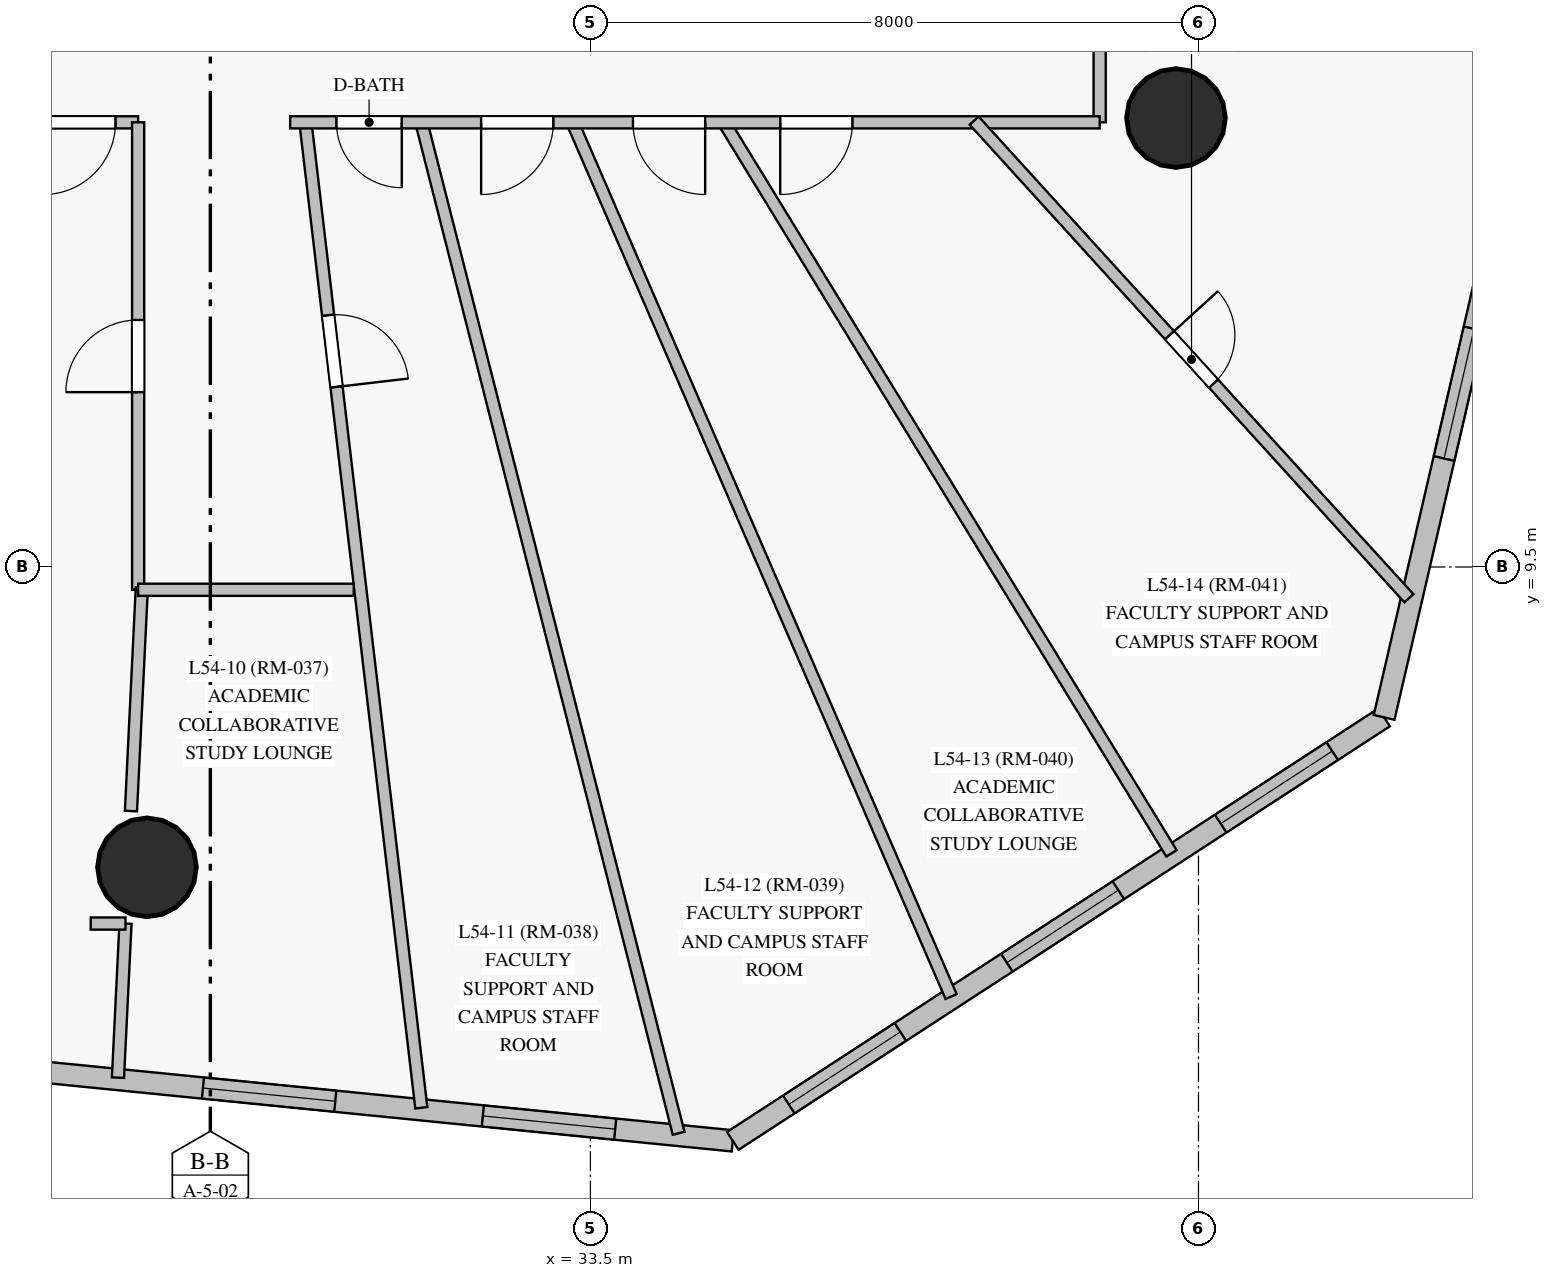
"""IFC4 building model, lengths in metres.
Left out: names, types, materials, properties, quantities, classifications, styles, units other than length and angle.
Written with IfcOpenShell. Run it as: python <this file> out.ifc"""

import sys

from ifc_helpers import new_model, si_unit, direction, frame, frame_2d, origin, origin_with_axes, origin_2d, place, context, subcontext, project, spatial, rectangle, circle, extrude, source, transform, mapped, element, fill, save


model = new_model("IFC4")
c1 = context("Model", 3, precision=1e-05, world=origin(), true_north=direction((0.0, 1.0)))
c2 = subcontext(c1, "Body", "Model", "MODEL_VIEW")
j1 = project(units=[si_unit("LENGTHUNIT", "METRE"), si_unit("PLANEANGLEUNIT", "RADIAN")], contexts=[c1])
p1 = place(None, origin())
s1 = spatial("IfcSite", under=j1, at=p1, CompositionType="ELEMENT")
p2 = place(p1, origin())
s2 = spatial("IfcBuilding", under=s1, at=p2, CompositionType="ELEMENT")
p3 = place(p2, frame((0.0, 0.0, 187.05)))
s3 = spatial("IfcBuildingStorey", under=s2, at=p3, CompositionType="ELEMENT", Elevation=187.05)
m1 = source(origin_with_axes(), c2, "Body", "SweptSolid", [
    extrude(circle(Radius=0.65, at=origin_2d()), origin(), (0.0, 0.0, 1.0), 3.05),
])
for number, where, z_axis, x_axis in (
    (1, (27.666, 5.549, 0.0), (0.0, 0.0, 1.0), (1.0, 0.0, 0.0)),
    (2, (41.204, 15.406, 0.0), (0.0, 0.0, 1.0), (1.0, 0.0, 0.0)),
):
    element("IfcColumn", number, at=place(p3, frame(where, z_axis=z_axis, x_axis=x_axis)), inside=s3, PredefinedType="COLUMN", context=c2, shape_type="MappedRepresentation", body=[
        mapped(m1, transform((0.0, 0.0, 0.0), scale=1.0)),
    ])
p4 = place(p3, frame((22.307, 3.253, 0.0), z_axis=(0.0, 0.0, 1.0), x_axis=(0.995061275338, -0.099262572617, 0.0)))
e3 = element("IfcWall", 3, at=p4, inside=s3, PredefinedType="SOLIDWALL", context=c2, shape_type="SweptSolid", body=[
    extrude(rectangle(XDim=13.132, YDim=0.28, at=frame_2d((6.566, 0.0))), origin(), (0.0, 0.0, 1.0), 2.825),
])
p5 = place(p4, frame((2.184, 0.0, 0.85)))
e4 = element("IfcOpeningElement", 4, at=p5, cuts=e3, PredefinedType="OPENING", context=c2, shape_type="SweptSolid", body=[
    extrude(rectangle(XDim=1.75, YDim=1.65, at=frame_2d((0.875, 0.825))), frame((0.0, 0.15, 0.0), z_axis=(0.0, -1.0, 0.0), x_axis=(1.0, 0.0, 0.0)), (0.0, 0.0, 1.0), 0.3),
])
p6 = place(p4, frame((6.125, 0.0, 0.85)))
e5 = element("IfcOpeningElement", 5, at=p6, cuts=e3, PredefinedType="OPENING", context=c2, shape_type="SweptSolid", body=[
    extrude(rectangle(XDim=1.75, YDim=1.65, at=frame_2d((0.875, 0.825))), frame((0.0, 0.15, 0.0), z_axis=(0.0, -1.0, 0.0), x_axis=(1.0, 0.0, 0.0)), (0.0, 0.0, 1.0), 0.3),
])
p7 = place(p4, frame((9.827, 0.0, 0.85)))
e6 = element("IfcOpeningElement", 6, at=p7, cuts=e3, PredefinedType="OPENING", context=c2, shape_type="SweptSolid", body=[
    extrude(rectangle(XDim=1.75, YDim=1.65, at=frame_2d((0.875, 0.825))), frame((0.0, 0.15, 0.0), z_axis=(0.0, -1.0, 0.0), x_axis=(1.0, 0.0, 0.0)), (0.0, 0.0, 1.0), 0.3),
])
p8 = place(p3, frame((35.374, 1.95, 0.0), z_axis=(0.0, 0.0, 1.0), x_axis=(0.838363930123, 0.545110925105, 0.0)))
e7 = element("IfcWall", 7, at=p8, inside=s3, PredefinedType="SOLIDWALL", context=c2, shape_type="SweptSolid", body=[
    extrude(rectangle(XDim=10.221, YDim=0.28, at=frame_2d((5.11, 0.0))), origin(), (0.0, 0.0, 1.0), 2.825),
])
p9 = place(p8, frame((0.879, 0.0, 0.85)))
e8 = element("IfcOpeningElement", 8, at=p9, cuts=e7, PredefinedType="OPENING", context=c2, shape_type="SweptSolid", body=[
    extrude(rectangle(XDim=1.75, YDim=1.65, at=frame_2d((0.875, 0.825))), frame((0.0, 0.15, 0.0), z_axis=(0.0, -1.0, 0.0), x_axis=(1.0, 0.0, 0.0)), (0.0, 0.0, 1.0), 0.3),
])
p10 = place(p8, frame((4.3, 0.0, 0.85)))
e9 = element("IfcOpeningElement", 9, at=p10, cuts=e7, PredefinedType="OPENING", context=c2, shape_type="SweptSolid", body=[
    extrude(rectangle(XDim=1.75, YDim=1.65, at=frame_2d((0.875, 0.825))), frame((0.0, 0.15, 0.0), z_axis=(0.0, -1.0, 0.0), x_axis=(1.0, 0.0, 0.0)), (0.0, 0.0, 1.0), 0.3),
])
p11 = place(p8, frame((7.656, 0.0, 0.85)))
e10 = element("IfcOpeningElement", 10, at=p11, cuts=e7, PredefinedType="OPENING", context=c2, shape_type="SweptSolid", body=[
    extrude(rectangle(XDim=1.75, YDim=1.65, at=frame_2d((0.875, 0.825))), frame((0.0, 0.15, 0.0), z_axis=(0.0, -1.0, 0.0), x_axis=(1.0, 0.0, 0.0)), (0.0, 0.0, 1.0), 0.3),
])
p12 = place(p3, frame((43.942, 7.521, 0.0), z_axis=(0.0, 0.0, 1.0), x_axis=(0.225598723883, 0.974220311727, 0.0)))
e11 = element("IfcWall", 11, at=p12, inside=s3, PredefinedType="SOLIDWALL", context=c2, shape_type="SweptSolid", body=[
    extrude(rectangle(XDim=14.375, YDim=0.28, at=frame_2d((7.188, 0.0))), origin(), (0.0, 0.0, 1.0), 2.825),
])
p13 = place(p12, frame((3.496, 0.0, 0.85)))
e12 = element("IfcOpeningElement", 12, at=p13, cuts=e11, PredefinedType="OPENING", context=c2, shape_type="SweptSolid", body=[
    extrude(rectangle(XDim=1.75, YDim=1.65, at=frame_2d((0.875, 0.825))), frame((0.0, 0.15, 0.0), z_axis=(0.0, -1.0, 0.0), x_axis=(1.0, 0.0, 0.0)), (0.0, 0.0, 1.0), 0.3),
])
p14 = place(p12, frame((8.356, 0.0, 0.85)))
e13 = element("IfcOpeningElement", 13, at=p14, cuts=e11, PredefinedType="OPENING", context=c2, shape_type="SweptSolid", body=[
    extrude(rectangle(XDim=1.75, YDim=1.65, at=frame_2d((0.875, 0.825))), frame((0.0, 0.15, 0.0), z_axis=(0.0, -1.0, 0.0), x_axis=(1.0, 0.0, 0.0)), (0.0, 0.0, 1.0), 0.3),
])
p15 = place(p12, frame((12.673, 0.0, 0.85)))
e14 = element("IfcOpeningElement", 14, at=p15, cuts=e11, PredefinedType="OPENING", context=c2, shape_type="SweptSolid", body=[
    extrude(rectangle(XDim=0.95, YDim=1.5, at=frame_2d((0.475, 0.75))), frame((0.0, 0.15, 0.0), z_axis=(0.0, -1.0, 0.0), x_axis=(1.0, 0.0, 0.0)), (0.0, 0.0, 1.0), 0.3),
])
p16 = place(p3, frame((40.2, 37.65, 0.0), z_axis=(0.0, 0.0, 1.0), x_axis=(0.0, -1.0, 0.0)))
e15 = element("IfcWall", 15, at=p16, inside=s3, PredefinedType="PARTITIONING", context=c2, shape_type="SweptSolid", body=[
    extrude(rectangle(XDim=22.3, YDim=0.16, at=frame_2d((11.15, 0.0))), origin(), (0.0, 0.0, 1.0), 2.375),
])
p17 = place(p16, frame((18.567, 0.0, 0.0)))
e16 = element("IfcOpeningElement", 16, at=p17, cuts=e15, PredefinedType="OPENING", context=c2, shape_type="SweptSolid", body=[
    extrude(rectangle(XDim=0.95, YDim=2.15, at=frame_2d((0.475, 1.075))), frame((0.0, 0.09, 0.0), z_axis=(0.0, -1.0, 0.0), x_axis=(1.0, 0.0, 0.0)), (0.0, 0.0, 1.0), 0.18),
])
p18 = place(p16, frame((11.165, 0.0, 0.0)))
e17 = element("IfcOpeningElement", 17, at=p18, cuts=e15, PredefinedType="OPENING", context=c2, shape_type="SweptSolid", body=[
    extrude(rectangle(XDim=0.95, YDim=2.15, at=frame_2d((0.475, 1.075))), frame((0.0, 0.09, 0.0), z_axis=(0.0, -1.0, 0.0), x_axis=(1.0, 0.0, 0.0)), (0.0, 0.0, 1.0), 0.18),
])
p19 = place(p16, frame((7.33, 0.0, 0.0)))
e18 = element("IfcOpeningElement", 18, at=p19, cuts=e15, PredefinedType="OPENING", context=c2, shape_type="SweptSolid", body=[
    extrude(rectangle(XDim=0.95, YDim=2.15, at=frame_2d((0.475, 1.075))), frame((0.0, 0.09, 0.0), z_axis=(0.0, -1.0, 0.0), x_axis=(1.0, 0.0, 0.0)), (0.0, 0.0, 1.0), 0.18),
])
p20 = place(p16, frame((4.66, 0.0, 0.0)))
e19 = element("IfcOpeningElement", 19, at=p20, cuts=e15, PredefinedType="OPENING", context=c2, shape_type="SweptSolid", body=[
    extrude(rectangle(XDim=0.95, YDim=2.15, at=frame_2d((0.475, 1.075))), frame((0.0, 0.09, 0.0), z_axis=(0.0, -1.0, 0.0), x_axis=(1.0, 0.0, 0.0)), (0.0, 0.0, 1.0), 0.18),
])
p21 = place(p3, frame((31.268, 15.379, 0.0), z_axis=(0.0, 0.0, 1.0), x_axis=(0.2466474547, -0.969105274513, 0.0)))
e20 = element("IfcWall", 20, at=p21, inside=s3, PredefinedType="PARTITIONING", context=c2, shape_type="SweptSolid", body=[
    extrude(rectangle(XDim=13.754, YDim=0.16, at=frame_2d((6.877, 0.0))), origin(), (0.0, 0.0, 1.0), 2.825),
])
p22 = place(p3, frame((29.747, 15.38, 0.0), z_axis=(0.0, 0.0, 1.0), x_axis=(0.11680660379, -0.993154679449, 0.0)))
e21 = element("IfcWall", 21, at=p22, inside=s3, PredefinedType="PARTITIONING", context=c2, shape_type="SweptSolid", body=[
    extrude(rectangle(XDim=13.084, YDim=0.16, at=frame_2d((6.542, 0.0))), origin(), (0.0, 0.0, 1.0), 2.825),
])
p23 = place(p22, frame((2.585, 0.0, 0.0)))
e22 = element("IfcOpeningElement", 22, at=p23, cuts=e21, PredefinedType="OPENING", context=c2, shape_type="SweptSolid", body=[
    extrude(rectangle(XDim=0.95, YDim=2.15, at=frame_2d((0.475, 1.075))), frame((0.0, 0.09, 0.0), z_axis=(0.0, -1.0, 0.0), x_axis=(1.0, 0.0, 0.0)), (0.0, 0.0, 1.0), 0.18),
])
p24 = place(p3, frame((33.252, 15.377, 0.0), z_axis=(0.0, 0.0, 1.0), x_axis=(0.397438924914, -0.917628629111, 0.0)))
e23 = element("IfcWall", 23, at=p24, inside=s3, PredefinedType="PARTITIONING", context=c2, shape_type="SweptSolid", body=[
    extrude(rectangle(XDim=12.564, YDim=0.16, at=frame_2d((6.282, 0.0))), origin(), (0.0, 0.0, 1.0), 2.825),
])
p25 = place(p3, frame((35.241, 15.375, 0.0), z_axis=(0.0, 0.0, 1.0), x_axis=(0.522187833878, -0.852830502591, 0.0)))
e24 = element("IfcWall", 24, at=p25, inside=s3, PredefinedType="PARTITIONING", context=c2, shape_type="SweptSolid", body=[
    extrude(rectangle(XDim=11.307, YDim=0.16, at=frame_2d((5.653, 0.0))), origin(), (0.0, 0.0, 1.0), 2.825),
])
p26 = place(p3, frame((27.55, 15.35, 0.0), z_axis=(0.0, 0.0, 1.0), x_axis=(-1.0, 0.0, 0.0)))
e25 = element("IfcWall", 25, at=p26, inside=s3, PredefinedType="PARTITIONING", context=c2, shape_type="SweptSolid", body=[
    extrude(rectangle(XDim=10.85, YDim=0.16, at=frame_2d((5.425, 0.0))), origin(), (0.0, 0.0, 1.0), 2.375),
])
p27 = place(p26, frame((6.968, 0.0, 0.0)))
e26 = element("IfcOpeningElement", 26, at=p27, cuts=e25, PredefinedType="OPENING", context=c2, shape_type="SweptSolid", body=[
    extrude(rectangle(XDim=0.95, YDim=2.15, at=frame_2d((0.475, 1.075))), frame((0.0, 0.09, 0.0), z_axis=(0.0, -1.0, 0.0), x_axis=(1.0, 0.0, 0.0)), (0.0, 0.0, 1.0), 0.18),
])
p28 = place(p26, frame((3.71, 0.0, 0.0)))
e27 = element("IfcOpeningElement", 27, at=p28, cuts=e25, PredefinedType="OPENING", context=c2, shape_type="SweptSolid", body=[
    extrude(rectangle(XDim=0.95, YDim=2.15, at=frame_2d((0.475, 1.075))), frame((0.0, 0.09, 0.0), z_axis=(0.0, -1.0, 0.0), x_axis=(1.0, 0.0, 0.0)), (0.0, 0.0, 1.0), 0.18),
])
p29 = place(p26, frame((2.032, 0.0, 0.0)))
e28 = element("IfcOpeningElement", 28, at=p29, cuts=e25, PredefinedType="OPENING", context=c2, shape_type="SweptSolid", body=[
    extrude(rectangle(XDim=0.95, YDim=2.15, at=frame_2d((0.475, 1.075))), frame((0.0, 0.09, 0.0), z_axis=(0.0, -1.0, 0.0), x_axis=(1.0, 0.0, 0.0)), (0.0, 0.0, 1.0), 0.18),
])
p30 = place(p26, frame((0.298, 0.0, 0.0)))
e29 = element("IfcOpeningElement", 29, at=p30, cuts=e25, PredefinedType="OPENING", context=c2, shape_type="SweptSolid", body=[
    extrude(rectangle(XDim=0.95, YDim=2.15, at=frame_2d((0.475, 1.075))), frame((0.0, 0.09, 0.0), z_axis=(0.0, -1.0, 0.0), x_axis=(1.0, 0.0, 0.0)), (0.0, 0.0, 1.0), 0.18),
])
p31 = place(p3, frame((40.2, 15.35, 0.0), z_axis=(0.0, 0.0, 1.0), x_axis=(-1.0, 0.0, 0.0)))
e30 = element("IfcWall", 30, at=p31, inside=s3, PredefinedType="PARTITIONING", context=c2, shape_type="SweptSolid", body=[
    extrude(rectangle(XDim=10.65, YDim=0.16, at=frame_2d((5.325, 0.0))), origin(), (0.0, 0.0, 1.0), 2.275),
])
p32 = place(p31, frame((9.181, 0.0, 0.0)))
e31 = element("IfcOpeningElement", 31, at=p32, cuts=e30, PredefinedType="OPENING", context=c2, shape_type="SweptSolid", body=[
    extrude(rectangle(XDim=0.86, YDim=2.1, at=frame_2d((0.43, 1.05))), frame((0.0, 0.09, 0.0), z_axis=(0.0, -1.0, 0.0), x_axis=(1.0, 0.0, 0.0)), (0.0, 0.0, 1.0), 0.18),
])
p33 = place(p31, frame((7.188, 0.0, 0.0)))
e32 = element("IfcOpeningElement", 32, at=p33, cuts=e30, PredefinedType="OPENING", context=c2, shape_type="SweptSolid", body=[
    extrude(rectangle(XDim=0.95, YDim=2.15, at=frame_2d((0.475, 1.075))), frame((0.0, 0.09, 0.0), z_axis=(0.0, -1.0, 0.0), x_axis=(1.0, 0.0, 0.0)), (0.0, 0.0, 1.0), 0.18),
])
p34 = place(p31, frame((5.19, 0.0, 0.0)))
e33 = element("IfcOpeningElement", 33, at=p34, cuts=e30, PredefinedType="OPENING", context=c2, shape_type="SweptSolid", body=[
    extrude(rectangle(XDim=0.95, YDim=2.15, at=frame_2d((0.475, 1.075))), frame((0.0, 0.09, 0.0), z_axis=(0.0, -1.0, 0.0), x_axis=(1.0, 0.0, 0.0)), (0.0, 0.0, 1.0), 0.18),
])
p35 = place(p31, frame((3.252, 0.0, 0.0)))
e34 = element("IfcOpeningElement", 34, at=p35, cuts=e30, PredefinedType="OPENING", context=c2, shape_type="SweptSolid", body=[
    extrude(rectangle(XDim=0.95, YDim=2.15, at=frame_2d((0.475, 1.075))), frame((0.0, 0.09, 0.0), z_axis=(0.0, -1.0, 0.0), x_axis=(1.0, 0.0, 0.0)), (0.0, 0.0, 1.0), 0.18),
])
p36 = place(p3, frame((38.549, 15.372, 0.0), z_axis=(0.0, 0.0, 1.0), x_axis=(0.673168934691, -0.739488732414, 0.0)))
e35 = element("IfcWall", 35, at=p36, inside=s3, PredefinedType="PARTITIONING", context=c2, shape_type="SweptSolid", body=[
    extrude(rectangle(XDim=8.496, YDim=0.16, at=frame_2d((4.248, 0.0))), origin(), (0.0, 0.0, 1.0), 2.825),
])
p37 = place(p36, frame((3.818, 0.0, 0.0)))
e36 = element("IfcOpeningElement", 36, at=p37, cuts=e35, PredefinedType="OPENING", context=c2, shape_type="SweptSolid", body=[
    extrude(rectangle(XDim=0.86, YDim=2.04, at=frame_2d((0.43, 1.02))), frame((0.0, 0.09, 0.0), z_axis=(0.0, -1.0, 0.0), x_axis=(1.0, 0.0, 0.0)), (0.0, 0.0, 1.0), 0.18),
])
p38 = place(p3, frame((27.55, 9.2, 0.0), z_axis=(0.0, 0.0, 1.0), x_axis=(0.0, 1.0, 0.0)))
e37 = element("IfcWall", 37, at=p38, inside=s3, PredefinedType="PARTITIONING", context=c2, shape_type="SweptSolid", body=[
    extrude(rectangle(XDim=6.15, YDim=0.16, at=frame_2d((3.075, 0.0))), origin(), (0.0, 0.0, 1.0), 2.275),
])
p39 = place(p38, frame((2.6, 0.0, 0.0)))
e38 = element("IfcOpeningElement", 38, at=p39, cuts=e37, PredefinedType="OPENING", context=c2, shape_type="SweptSolid", body=[
    extrude(rectangle(XDim=0.95, YDim=2.15, at=frame_2d((0.475, 1.075))), frame((0.0, 0.09, 0.0), z_axis=(0.0, -1.0, 0.0), x_axis=(1.0, 0.0, 0.0)), (0.0, 0.0, 1.0), 0.18),
])
p40 = place(p3, frame((27.599, 9.23, 0.0), z_axis=(0.0, 0.0, 1.0), x_axis=(-0.048672114697, -0.998814810288, 0.0)))
e39 = element("IfcWall", 39, at=p40, inside=s3, PredefinedType="PARTITIONING", context=c2, shape_type="SweptSolid", body=[
    extrude(rectangle(XDim=2.944, YDim=0.16, at=frame_2d((1.472, 0.0))), origin(), (0.0, 0.0, 1.0), 2.275),
])
p41 = place(p3, frame((30.387, 9.2, 0.0), z_axis=(0.0, 0.0, 1.0), x_axis=(-1.0, 0.0, 0.0)))
e40 = element("IfcWall", 40, at=p41, inside=s3, PredefinedType="PARTITIONING", context=c2, shape_type="SweptSolid", body=[
    extrude(rectangle(XDim=2.837, YDim=0.16, at=frame_2d((1.418, 0.0))), origin(), (0.0, 0.0, 1.0), 2.495),
])
p42 = place(p3, frame((27.384, 4.809, 0.0), z_axis=(0.0, 0.0, 1.0), x_axis=(-0.048719626645, -0.998812493904, 0.0)))
e41 = element("IfcWall", 41, at=p42, inside=s3, PredefinedType="PARTITIONING", context=c2, shape_type="SweptSolid", body=[
    extrude(rectangle(XDim=2.03, YDim=0.16, at=frame_2d((1.015, 0.0))), origin(), (0.0, 0.0, 1.0), 2.825),
])
p43 = place(p3, frame((26.926, 4.809, 0.0), z_axis=(0.0, 0.0, 1.0), x_axis=(1.0, 0.0, 0.0)))
e42 = element("IfcWall", 42, at=p43, inside=s3, PredefinedType="PARTITIONING", context=c2, shape_type="SweptSolid", body=[
    extrude(rectangle(XDim=0.458, YDim=0.16, at=frame_2d((0.229, 0.0))), origin(), (0.0, 0.0, 1.0), 2.825),
])
m2 = source(origin_with_axes(), c2, "Body", "SweptSolid", [
    extrude(rectangle(XDim=1.75, YDim=1.65, at=frame_2d((0.875, 0.825))), frame((0.0, 0.03, 0.0), z_axis=(0.0, -1.0, 0.0), x_axis=(1.0, 0.0, 0.0)), (0.0, 0.0, 1.0), 0.06),
])
p44 = place(p6, origin())
e43 = element("IfcWindow", 43, at=p44, inside=s3, PartitioningType="SINGLE_PANEL", PredefinedType="WINDOW", context=c2, shape_type="MappedRepresentation", body=[
    mapped(m2, transform((0.0, 0.0, 0.0), scale=1.0)),
])
fill(e5, e43)
p45 = place(p7, origin())
e44 = element("IfcWindow", 44, at=p45, inside=s3, PartitioningType="SINGLE_PANEL", PredefinedType="WINDOW", context=c2, shape_type="MappedRepresentation", body=[
    mapped(m2, transform((0.0, 0.0, 0.0), scale=1.0)),
])
fill(e6, e44)
p46 = place(p9, origin())
e45 = element("IfcWindow", 45, at=p46, inside=s3, PartitioningType="SINGLE_PANEL", PredefinedType="WINDOW", context=c2, shape_type="MappedRepresentation", body=[
    mapped(m2, transform((0.0, 0.0, 0.0), scale=1.0)),
])
fill(e8, e45)
p47 = place(p10, origin())
e46 = element("IfcWindow", 46, at=p47, inside=s3, PartitioningType="SINGLE_PANEL", PredefinedType="WINDOW", context=c2, shape_type="MappedRepresentation", body=[
    mapped(m2, transform((0.0, 0.0, 0.0), scale=1.0)),
])
fill(e9, e46)
p48 = place(p11, origin())
e47 = element("IfcWindow", 47, at=p48, inside=s3, PartitioningType="SINGLE_PANEL", PredefinedType="WINDOW", context=c2, shape_type="MappedRepresentation", body=[
    mapped(m2, transform((0.0, 0.0, 0.0), scale=1.0)),
])
fill(e10, e47)
p49 = place(p13, origin())
e48 = element("IfcWindow", 48, at=p49, inside=s3, PartitioningType="SINGLE_PANEL", PredefinedType="WINDOW", context=c2, shape_type="MappedRepresentation", body=[
    mapped(m2, transform((0.0, 0.0, 0.0), scale=1.0)),
])
fill(e12, e48)
m3 = source(origin_with_axes(), c2, "Body", "SweptSolid", [
    extrude(rectangle(XDim=0.95, YDim=2.15, at=frame_2d((0.475, 1.075))), frame((0.0, 0.025, 0.0), z_axis=(0.0, -1.0, 0.0), x_axis=(1.0, 0.0, 0.0)), (0.0, 0.0, 1.0), 0.05),
])
p50 = place(p30, origin())
e49 = element("IfcDoor", 49, at=p50, inside=s3, OperationType="SINGLE_SWING_RIGHT", PredefinedType="DOOR", context=c2, shape_type="MappedRepresentation", body=[
    mapped(m3, transform((0.0, 0.0, 0.0), scale=1.0)),
])
fill(e29, e49)
p51 = place(p39, origin())
e50 = element("IfcDoor", 50, at=p51, inside=s3, OperationType="SINGLE_SWING_LEFT", PredefinedType="DOOR", context=c2, shape_type="MappedRepresentation", body=[
    mapped(m3, transform((0.0, 0.0, 0.0), scale=1.0)),
])
fill(e38, e50)
p52 = place(p23, origin())
e51 = element("IfcDoor", 51, at=p52, inside=s3, OperationType="SINGLE_SWING_RIGHT", PredefinedType="DOOR", context=c2, shape_type="MappedRepresentation", body=[
    mapped(m3, transform((0.0, 0.0, 0.0), scale=1.0)),
])
fill(e22, e51)
m4 = source(origin_with_axes(), c2, "Body", "SweptSolid", [
    extrude(rectangle(XDim=0.86, YDim=2.1, at=frame_2d((0.43, 1.05))), frame((0.0, 0.025, 0.0), z_axis=(0.0, -1.0, 0.0), x_axis=(1.0, 0.0, 0.0)), (0.0, 0.0, 1.0), 0.05),
])
p53 = place(p32, origin())
e52 = element("IfcDoor", 52, at=p53, inside=s3, OperationType="SINGLE_SWING_LEFT", PredefinedType="DOOR", context=c2, shape_type="MappedRepresentation", body=[
    mapped(m4, transform((0.0, 0.0, 0.0), scale=1.0)),
])
fill(e31, e52)
p54 = place(p33, origin())
e53 = element("IfcDoor", 53, at=p54, inside=s3, OperationType="SINGLE_SWING_RIGHT", PredefinedType="DOOR", context=c2, shape_type="MappedRepresentation", body=[
    mapped(m3, transform((0.0, 0.0, 0.0), scale=1.0)),
])
fill(e32, e53)
p55 = place(p34, origin())
e54 = element("IfcDoor", 54, at=p55, inside=s3, OperationType="SINGLE_SWING_LEFT", PredefinedType="DOOR", context=c2, shape_type="MappedRepresentation", body=[
    mapped(m3, transform((0.0, 0.0, 0.0), scale=1.0)),
])
fill(e33, e54)
p56 = place(p35, origin())
e55 = element("IfcDoor", 55, at=p56, inside=s3, OperationType="SINGLE_SWING_RIGHT", PredefinedType="DOOR", context=c2, shape_type="MappedRepresentation", body=[
    mapped(m3, transform((0.0, 0.0, 0.0), scale=1.0)),
])
fill(e34, e55)
m5 = source(origin_with_axes(), c2, "Body", "SweptSolid", [
    extrude(rectangle(XDim=0.86, YDim=2.04, at=frame_2d((0.43, 1.02))), frame((0.0, 0.025, 0.0), z_axis=(0.0, -1.0, 0.0), x_axis=(1.0, 0.0, 0.0)), (0.0, 0.0, 1.0), 0.05),
])
p57 = place(p37, origin())
e56 = element("IfcDoor", 56, at=p57, inside=s3, OperationType="SINGLE_SWING_LEFT", PredefinedType="DOOR", context=c2, shape_type="MappedRepresentation", body=[
    mapped(m5, transform((0.0, 0.0, 0.0), scale=1.0)),
])
fill(e36, e56)
save(model, sys.argv[1])
